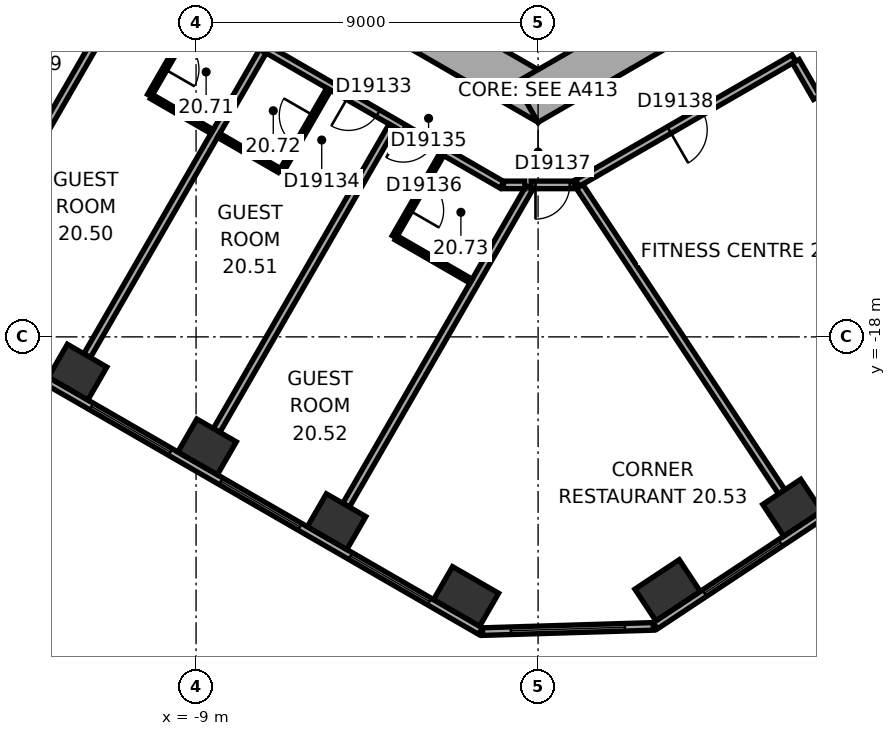
"""IFC4 building model, lengths in metres.
Left out: names, types, materials, properties, quantities, classifications, styles, units other than length and angle.
Written with IfcOpenShell. Run it as: python <this file> out.ifc"""

import sys

from ifc_helpers import new_model, si_unit, direction, frame, frame_2d, origin, origin_2d, place, context, subcontext, project, spatial, rectangle, extrude, element, fill, save


model = new_model("IFC4")
c1 = context("Model", 3, precision=1e-05, world=origin(), true_north=direction((0.0, 1.0)))
c2 = subcontext(c1, "Body", "Model", "MODEL_VIEW")
j1 = project(units=[si_unit("LENGTHUNIT", "METRE"), si_unit("PLANEANGLEUNIT", "RADIAN")], contexts=[c1])
p1 = place(None, origin())
s1 = spatial("IfcSite", under=j1, at=p1, CompositionType="ELEMENT")
p2 = place(p1, origin())
s2 = spatial("IfcBuilding", under=s1, at=p2, CompositionType="ELEMENT")
p3 = place(p2, frame((0.0, 0.0, 90.2)))
s3 = spatial("IfcBuildingStorey", under=s2, at=p3, CompositionType="ELEMENT", Elevation=90.2)
for number, where, z_axis, x_axis in (
    (1, (-12.117, -18.927, 0.0), (0.0, 0.0, 1.0), (0.866, -0.5, 0.0)),
    (2, (-8.71, -20.895, 0.0), (0.0, 0.0, 1.0), (0.866, -0.5, 0.0)),
    (3, (-5.302, -22.862, 0.0), (0.0, 0.0, 1.0), (0.866, -0.5, 0.0)),
):
    element("IfcColumn", number, at=place(p3, frame(where, z_axis=z_axis, x_axis=x_axis)), inside=s3, PredefinedType="COLUMN", context=c2, shape_type="SweptSolid", body=[
        extrude(rectangle(XDim=1.2, YDim=1.0, at=origin_2d()), origin(), (0.0, 0.0, 1.0), 3.3),
    ])
for number, where, z_axis, x_axis in (
    (4, (-1.895, -24.829, 0.0), (0.0, 0.0, 1.0), (0.866, -0.5, 0.0)),
    (5, (3.407, -24.667, 0.0), (0.0, 0.0, 1.0), (0.834, 0.552, 0.0)),
):
    element("IfcColumn", number, at=place(p3, frame(where, z_axis=z_axis, x_axis=x_axis)), inside=s3, PredefinedType="COLUMN", context=c2, shape_type="SweptSolid", body=[
        extrude(rectangle(XDim=1.4, YDim=1.0, at=origin_2d()), origin(), (0.0, 0.0, 1.0), 3.3),
    ])
p4 = place(p3, frame((6.688, -22.496, 0.0), z_axis=(0.0, 0.0, 1.0), x_axis=(0.833885822067, 0.551936985312, 0.0)))
e6 = element("IfcColumn", 6, at=p4, inside=s3, PredefinedType="COLUMN", context=c2, shape_type="SweptSolid", body=[
    extrude(rectangle(XDim=1.2, YDim=1.0, at=origin_2d()), origin(), (0.0, 0.0, 1.0), 3.3),
])
p5 = place(p3, frame((-10.4, -5.658, 0.0), z_axis=(0.0, 0.0, 1.0), x_axis=(0.866021384402, -0.500006961711, 0.0)))
e7 = element("IfcWall", 7, at=p5, inside=s3, PredefinedType="SHEAR", context=c2, shape_type="SweptSolid", body=[
    extrude(rectangle(XDim=12.355, YDim=1.2, at=frame_2d((6.178, 0.0))), origin(), (0.0, 0.0, 1.0), 3.3),
])
p6 = place(p5, frame((6.378, 0.0, 0.0)))
e8 = element("IfcOpeningElement", 8, at=p6, cuts=e7, PredefinedType="OPENING", context=c2, shape_type="SweptSolid", body=[
    extrude(rectangle(XDim=1.5, YDim=2.1, at=frame_2d((0.75, 1.05))), frame((0.0, 0.61, 0.0), z_axis=(0.0, -1.0, 0.0), x_axis=(1.0, 0.0, 0.0)), (0.0, 0.0, 1.0), 1.22),
])
p7 = place(p5, frame((3.228, 0.0, 0.0)))
e9 = element("IfcOpeningElement", 9, at=p7, cuts=e7, PredefinedType="OPENING", context=c2, shape_type="SweptSolid", body=[
    extrude(rectangle(XDim=0.9, YDim=2.1, at=frame_2d((0.45, 1.05))), frame((0.0, 0.61, 0.0), z_axis=(0.0, -1.0, 0.0), x_axis=(1.0, 0.0, 0.0)), (0.0, 0.0, 1.0), 1.22),
])
p8 = place(p3, frame((-0.3, -11.836, 0.0), z_axis=(0.0, 0.0, 1.0), x_axis=(0.866021384402, 0.500006961711, 0.0)))
e10 = element("IfcWall", 10, at=p8, inside=s3, PredefinedType="SHEAR", context=c2, shape_type="SweptSolid", body=[
    extrude(rectangle(XDim=12.355, YDim=1.2, at=frame_2d((6.178, 0.0))), origin(), (0.0, 0.0, 1.0), 3.3),
])
p9 = place(p8, frame((4.128, 0.0, 0.0)))
e11 = element("IfcOpeningElement", 11, at=p9, cuts=e10, PredefinedType="OPENING", context=c2, shape_type="SweptSolid", body=[
    extrude(rectangle(XDim=0.9, YDim=2.1, at=frame_2d((0.45, 1.05))), frame((0.0, 0.61, 0.0), z_axis=(0.0, -1.0, 0.0), x_axis=(1.0, 0.0, 0.0)), (0.0, 0.0, 1.0), 1.22),
])
p10 = place(p8, frame((7.928, 0.0, 0.0)))
e12 = element("IfcOpeningElement", 12, at=p10, cuts=e10, PredefinedType="OPENING", context=c2, shape_type="SweptSolid", body=[
    extrude(rectangle(XDim=1.1, YDim=2.1, at=frame_2d((0.55, 1.05))), frame((0.0, 0.61, 0.0), z_axis=(0.0, -1.0, 0.0), x_axis=(1.0, 0.0, 0.0)), (0.0, 0.0, 1.0), 1.22),
])
p11 = place(p3, frame((-19.914, -15.119, 0.0), z_axis=(0.0, 0.0, 1.0), x_axis=(0.866025418898, -0.499999973822, 0.0)))
e13 = element("IfcWall", 13, at=p11, inside=s3, PredefinedType="STANDARD", context=c2, shape_type="SweptSolid", body=[
    extrude(rectangle(XDim=21.246, YDim=0.2, at=frame_2d((10.623, 0.0))), origin(), (0.0, 0.0, 1.0), 3.3),
])
p12 = place(p11, frame((1.555, 0.0, 0.8)))
e14 = element("IfcOpeningElement", 14, at=p12, cuts=e13, PredefinedType="OPENING", context=c2, shape_type="SweptSolid", body=[
    extrude(rectangle(XDim=2.4, YDim=1.7, at=frame_2d((1.2, 0.85))), frame((0.0, 0.11, 0.0), z_axis=(0.0, -1.0, 0.0), x_axis=(1.0, 0.0, 0.0)), (0.0, 0.0, 1.0), 0.22),
])
p13 = place(p11, frame((5.489, 0.0, 0.8)))
e15 = element("IfcOpeningElement", 15, at=p13, cuts=e13, PredefinedType="OPENING", context=c2, shape_type="SweptSolid", body=[
    extrude(rectangle(XDim=2.4, YDim=1.7, at=frame_2d((1.2, 0.85))), frame((0.0, 0.11, 0.0), z_axis=(0.0, -1.0, 0.0), x_axis=(1.0, 0.0, 0.0)), (0.0, 0.0, 1.0), 0.22),
])
p14 = place(p11, frame((9.424, 0.0, 0.8)))
e16 = element("IfcOpeningElement", 16, at=p14, cuts=e13, PredefinedType="OPENING", context=c2, shape_type="SweptSolid", body=[
    extrude(rectangle(XDim=2.4, YDim=1.7, at=frame_2d((1.2, 0.85))), frame((0.0, 0.11, 0.0), z_axis=(0.0, -1.0, 0.0), x_axis=(1.0, 0.0, 0.0)), (0.0, 0.0, 1.0), 0.22),
])
p15 = place(p11, frame((13.358, 0.0, 0.8)))
e17 = element("IfcOpeningElement", 17, at=p15, cuts=e13, PredefinedType="OPENING", context=c2, shape_type="SweptSolid", body=[
    extrude(rectangle(XDim=2.4, YDim=1.7, at=frame_2d((1.2, 0.85))), frame((0.0, 0.11, 0.0), z_axis=(0.0, -1.0, 0.0), x_axis=(1.0, 0.0, 0.0)), (0.0, 0.0, 1.0), 0.22),
])
p16 = place(p11, frame((17.293, 0.0, 0.8)))
e18 = element("IfcOpeningElement", 18, at=p16, cuts=e13, PredefinedType="OPENING", context=c2, shape_type="SweptSolid", body=[
    extrude(rectangle(XDim=2.4, YDim=1.7, at=frame_2d((1.2, 0.85))), frame((0.0, 0.11, 0.0), z_axis=(0.0, -1.0, 0.0), x_axis=(1.0, 0.0, 0.0)), (0.0, 0.0, 1.0), 0.22),
])
p17 = place(p3, frame((-1.461, -25.755, 0.0), z_axis=(0.0, 0.0, 1.0), x_axis=(0.999533823446, 0.030530898895, 0.0)))
e19 = element("IfcWall", 19, at=p17, inside=s3, PredefinedType="STANDARD", context=c2, shape_type="SweptSolid", body=[
    extrude(rectangle(XDim=4.494, YDim=0.2, at=frame_2d((2.247, 0.0))), origin(), (0.0, 0.0, 1.0), 3.3),
])
p18 = place(p17, frame((0.747, 0.0, 0.8)))
e20 = element("IfcOpeningElement", 20, at=p18, cuts=e19, PredefinedType="OPENING", context=c2, shape_type="SweptSolid", body=[
    extrude(rectangle(XDim=3.0, YDim=1.7, at=frame_2d((1.5, 0.85))), frame((0.0, 0.11, 0.0), z_axis=(0.0, -1.0, 0.0), x_axis=(1.0, 0.0, 0.0)), (0.0, 0.0, 1.0), 0.22),
])
p19 = place(p3, frame((3.083, -25.601, 0.0), z_axis=(0.0, 0.0, 1.0), x_axis=(0.833884295743, 0.551939291329, 0.0)))
e21 = element("IfcWall", 21, at=p19, inside=s3, PredefinedType="STANDARD", context=c2, shape_type="SweptSolid", body=[
    extrude(rectangle(XDim=21.246, YDim=0.2, at=frame_2d((10.623, 0.0))), origin(), (0.0, 0.0, 1.0), 3.3),
])
p20 = place(p19, frame((1.553, 0.0, 0.8)))
e22 = element("IfcOpeningElement", 22, at=p20, cuts=e21, PredefinedType="OPENING", context=c2, shape_type="SweptSolid", body=[
    extrude(rectangle(XDim=2.4, YDim=1.7, at=frame_2d((1.2, 0.85))), frame((0.0, 0.11, 0.0), z_axis=(0.0, -1.0, 0.0), x_axis=(1.0, 0.0, 0.0)), (0.0, 0.0, 1.0), 0.22),
])
p21 = place(p19, frame((5.488, 0.0, 0.8)))
e23 = element("IfcOpeningElement", 23, at=p21, cuts=e21, PredefinedType="OPENING", context=c2, shape_type="SweptSolid", body=[
    extrude(rectangle(XDim=2.4, YDim=1.7, at=frame_2d((1.2, 0.85))), frame((0.0, 0.11, 0.0), z_axis=(0.0, -1.0, 0.0), x_axis=(1.0, 0.0, 0.0)), (0.0, 0.0, 1.0), 0.22),
])
p22 = place(p19, frame((9.422, 0.0, 0.8)))
e24 = element("IfcOpeningElement", 24, at=p22, cuts=e21, PredefinedType="OPENING", context=c2, shape_type="SweptSolid", body=[
    extrude(rectangle(XDim=2.4, YDim=1.7, at=frame_2d((1.2, 0.85))), frame((0.0, 0.11, 0.0), z_axis=(0.0, -1.0, 0.0), x_axis=(1.0, 0.0, 0.0)), (0.0, 0.0, 1.0), 0.22),
])
p23 = place(p19, frame((13.357, 0.0, 0.8)))
e25 = element("IfcOpeningElement", 25, at=p23, cuts=e21, PredefinedType="OPENING", context=c2, shape_type="SweptSolid", body=[
    extrude(rectangle(XDim=2.4, YDim=1.7, at=frame_2d((1.2, 0.85))), frame((0.0, 0.11, 0.0), z_axis=(0.0, -1.0, 0.0), x_axis=(1.0, 0.0, 0.0)), (0.0, 0.0, 1.0), 0.22),
])
p24 = place(p19, frame((17.291, 0.0, 0.8)))
e26 = element("IfcOpeningElement", 26, at=p24, cuts=e21, PredefinedType="OPENING", context=c2, shape_type="SweptSolid", body=[
    extrude(rectangle(XDim=2.4, YDim=1.7, at=frame_2d((1.2, 0.85))), frame((0.0, 0.11, 0.0), z_axis=(0.0, -1.0, 0.0), x_axis=(1.0, 0.0, 0.0)), (0.0, 0.0, 1.0), 0.22),
])
p25 = place(p3, frame((-15.274, -16.527, 0.0), z_axis=(0.0, 0.0, 1.0), x_axis=(0.49998823431, 0.866032196602, 0.0)))
e27 = element("IfcWall", 27, at=p25, inside=s3, PredefinedType="PARTITIONING", context=c2, shape_type="SweptSolid", body=[
    extrude(rectangle(XDim=9.25, YDim=0.2, at=frame_2d((4.625, 0.0))), origin(), (0.0, 0.0, 1.0), 3.05),
])
p26 = place(p3, frame((-11.867, -18.494, 0.0), z_axis=(0.0, 0.0, 1.0), x_axis=(0.499999662836, 0.866025598446, 0.0)))
e28 = element("IfcWall", 28, at=p26, inside=s3, PredefinedType="PARTITIONING", context=c2, shape_type="SweptSolid", body=[
    extrude(rectangle(XDim=9.25, YDim=0.2, at=frame_2d((4.625, 0.0))), origin(), (0.0, 0.0, 1.0), 2.6),
])
p27 = place(p3, frame((-11.615, -7.843, 0.0), z_axis=(0.0, 0.0, 1.0), x_axis=(0.866026466995, -0.499998158461, 0.0)))
e29 = element("IfcWall", 29, at=p27, inside=s3, PredefinedType="PARTITIONING", context=c2, shape_type="SweptSolid", body=[
    extrude(rectangle(XDim=12.315, YDim=0.2, at=frame_2d((6.158, 0.0))), origin(), (0.0, 0.0, 1.0), 3.05),
])
p28 = place(p27, frame((1.665, 0.0, 0.0)))
e30 = element("IfcOpeningElement", 30, at=p28, cuts=e29, PredefinedType="OPENING", context=c2, shape_type="SweptSolid", body=[
    extrude(rectangle(XDim=0.9, YDim=2.1, at=frame_2d((0.45, 1.05))), frame((0.0, 0.11, 0.0), z_axis=(0.0, -1.0, 0.0), x_axis=(1.0, 0.0, 0.0)), (0.0, 0.0, 1.0), 0.22),
])
p29 = place(p27, frame((7.65, 0.0, 0.0)))
e31 = element("IfcOpeningElement", 31, at=p29, cuts=e29, PredefinedType="OPENING", context=c2, shape_type="SweptSolid", body=[
    extrude(rectangle(XDim=0.9, YDim=2.1, at=frame_2d((0.45, 1.05))), frame((0.0, 0.11, 0.0), z_axis=(0.0, -1.0, 0.0), x_axis=(1.0, 0.0, 0.0)), (0.0, 0.0, 1.0), 0.22),
])
p30 = place(p27, frame((9.317, 0.0, 0.0)))
e32 = element("IfcOpeningElement", 32, at=p30, cuts=e29, PredefinedType="OPENING", context=c2, shape_type="SweptSolid", body=[
    extrude(rectangle(XDim=0.9, YDim=2.1, at=frame_2d((0.45, 1.05))), frame((0.0, 0.11, 0.0), z_axis=(0.0, -1.0, 0.0), x_axis=(1.0, 0.0, 0.0)), (0.0, 0.0, 1.0), 0.22),
])
p31 = place(p3, frame((-10.224, -11.648, 0.0), z_axis=(0.0, 0.0, 1.0), x_axis=(0.500004234368, 0.866022959057, 0.0)))
e33 = element("IfcWall", 33, at=p31, inside=s3, PredefinedType="PARTITIONING", context=c2, shape_type="SweptSolid", body=[
    extrude(rectangle(XDim=2.5, YDim=0.12, at=frame_2d((1.25, 0.0))), origin(), (0.0, 0.0, 1.0), 3.05),
])
p32 = place(p31, frame((0.8, 0.0, 0.0)))
e34 = element("IfcOpeningElement", 34, at=p32, cuts=e33, PredefinedType="OPENING", context=c2, shape_type="SweptSolid", body=[
    extrude(rectangle(XDim=0.9, YDim=2.1, at=frame_2d((0.45, 1.05))), frame((0.0, 0.07, 0.0), z_axis=(0.0, -1.0, 0.0), x_axis=(1.0, 0.0, 0.0)), (0.0, 0.0, 1.0), 0.14),
])
p33 = place(p3, frame((-8.579, -12.598, 0.0), z_axis=(0.0, 0.0, 1.0), x_axis=(-0.866046386007, 0.499963655964, 0.0)))
e35 = element("IfcWall", 35, at=p33, inside=s3, PredefinedType="PARTITIONING", context=c2, shape_type="SweptSolid", body=[
    extrude(rectangle(XDim=1.84, YDim=0.12, at=frame_2d((0.92, 0.0))), origin(), (0.0, 0.0, 1.0), 3.05),
])
p34 = place(p3, frame((-8.46, -20.461, 0.0), z_axis=(0.0, 0.0, 1.0), x_axis=(0.499999662836, 0.866025598446, 0.0)))
e36 = element("IfcWall", 36, at=p34, inside=s3, PredefinedType="PARTITIONING", context=c2, shape_type="SweptSolid", body=[
    extrude(rectangle(XDim=9.25, YDim=0.2, at=frame_2d((4.625, 0.0))), origin(), (0.0, 0.0, 1.0), 3.05),
])
p35 = place(p3, frame((-6.812, -13.618, 0.0), z_axis=(0.0, 0.0, 1.0), x_axis=(-0.866046386007, 0.499963655964, 0.0)))
e37 = element("IfcWall", 37, at=p35, inside=s3, PredefinedType="PARTITIONING", context=c2, shape_type="SweptSolid", body=[
    extrude(rectangle(XDim=1.84, YDim=0.12, at=frame_2d((0.92, 0.0))), origin(), (0.0, 0.0, 1.0), 3.05),
])
p36 = place(p3, frame((-5.51, -11.483, 0.0), z_axis=(0.0, 0.0, 1.0), x_axis=(-0.500004234368, -0.866022959057, 0.0)))
e38 = element("IfcWall", 38, at=p36, inside=s3, PredefinedType="PARTITIONING", context=c2, shape_type="SweptSolid", body=[
    extrude(rectangle(XDim=2.5, YDim=0.12, at=frame_2d((1.25, 0.0))), origin(), (0.0, 0.0, 1.0), 3.05),
])
p37 = place(p36, frame((0.8, 0.0, 0.0)))
e39 = element("IfcOpeningElement", 39, at=p37, cuts=e38, PredefinedType="OPENING", context=c2, shape_type="SweptSolid", body=[
    extrude(rectangle(XDim=0.9, YDim=2.1, at=frame_2d((0.45, 1.05))), frame((0.0, 0.07, 0.0), z_axis=(0.0, -1.0, 0.0), x_axis=(1.0, 0.0, 0.0)), (0.0, 0.0, 1.0), 0.14),
])
p38 = place(p3, frame((-5.052, -22.429, 0.0), z_axis=(0.0, 0.0, 1.0), x_axis=(0.50000569793, 0.866022114058, 0.0)))
e40 = element("IfcWall", 40, at=p38, inside=s3, PredefinedType="PARTITIONING", context=c2, shape_type="SweptSolid", body=[
    extrude(rectangle(XDim=9.65, YDim=0.2, at=frame_2d((4.825, 0.0))), origin(), (0.0, 0.0, 1.0), 3.05),
])
p39 = place(p3, frame((-3.786, -15.366, 0.0), z_axis=(0.0, 0.0, 1.0), x_axis=(0.500004234368, 0.866022959057, 0.0)))
e41 = element("IfcWall", 41, at=p39, inside=s3, PredefinedType="PARTITIONING", context=c2, shape_type="SweptSolid", body=[
    extrude(rectangle(XDim=2.5, YDim=0.12, at=frame_2d((1.25, 0.0))), origin(), (0.0, 0.0, 1.0), 3.05),
])
p40 = place(p39, frame((0.8, 0.0, 0.0)))
e42 = element("IfcOpeningElement", 42, at=p40, cuts=e41, PredefinedType="OPENING", context=c2, shape_type="SweptSolid", body=[
    extrude(rectangle(XDim=0.9, YDim=2.1, at=frame_2d((0.45, 1.05))), frame((0.0, 0.07, 0.0), z_axis=(0.0, -1.0, 0.0), x_axis=(1.0, 0.0, 0.0)), (0.0, 0.0, 1.0), 0.14),
])
p41 = place(p3, frame((-1.764, -16.533, 0.0), z_axis=(0.0, 0.0, 1.0), x_axis=(-0.866008641419, 0.500029032144, 0.0)))
e43 = element("IfcWall", 43, at=p41, inside=s3, PredefinedType="PARTITIONING", context=c2, shape_type="SweptSolid", body=[
    extrude(rectangle(XDim=2.275, YDim=0.12, at=frame_2d((1.137, 0.0))), origin(), (0.0, 0.0, 1.0), 3.05),
])
p42 = place(p3, frame((-0.91, -14.001, 0.0), z_axis=(0.0, 0.0, 1.0), x_axis=(1.0, 0.0, 0.0)))
e44 = element("IfcWall", 44, at=p42, inside=s3, PredefinedType="PARTITIONING", context=c2, shape_type="SweptSolid", body=[
    extrude(rectangle(XDim=0.56, YDim=0.2, at=frame_2d((0.28, 0.0))), origin(), (0.0, 0.0, 1.0), 3.05),
])
p43 = place(p3, frame((-0.186, -14.001, 0.0), z_axis=(0.0, 0.0, 1.0), x_axis=(1.0, 0.0, 0.0)))
e45 = element("IfcWall", 45, at=p43, inside=s3, PredefinedType="PARTITIONING", context=c2, shape_type="SweptSolid", body=[
    extrude(rectangle(XDim=1.136, YDim=0.2, at=frame_2d((0.568, 0.0))), origin(), (0.0, 0.0, 1.0), 3.05),
])
p44 = place(p43, frame((0.118, 0.0, 0.0)))
e46 = element("IfcOpeningElement", 46, at=p44, cuts=e45, PredefinedType="OPENING", context=c2, shape_type="SweptSolid", body=[
    extrude(rectangle(XDim=0.9, YDim=2.1, at=frame_2d((0.45, 1.05))), frame((0.0, 0.11, 0.0), z_axis=(0.0, -1.0, 0.0), x_axis=(1.0, 0.0, 0.0)), (0.0, 0.0, 1.0), 0.22),
])
p45 = place(p3, frame((1.033, -13.953, 0.0), z_axis=(0.0, 0.0, 1.0), x_axis=(0.866017531406, 0.500013635111, 0.0)))
e47 = element("IfcWall", 47, at=p45, inside=s3, PredefinedType="PARTITIONING", context=c2, shape_type="SweptSolid", body=[
    extrude(rectangle(XDim=6.58, YDim=0.2, at=frame_2d((3.29, 0.0))), origin(), (0.0, 0.0, 1.0), 3.05),
])
p46 = place(p45, frame((2.79, 0.0, 0.0)))
e48 = element("IfcOpeningElement", 48, at=p46, cuts=e47, PredefinedType="OPENING", context=c2, shape_type="SweptSolid", body=[
    extrude(rectangle(XDim=1.0, YDim=2.1, at=frame_2d((0.5, 1.05))), frame((0.0, 0.11, 0.0), z_axis=(0.0, -1.0, 0.0), x_axis=(1.0, 0.0, 0.0)), (0.0, 0.0, 1.0), 0.22),
])
p47 = place(p3, frame((6.412, -22.079, 0.0), z_axis=(0.0, 0.0, 1.0), x_axis=(-0.551919507115, 0.83389739037, 0.0)))
e49 = element("IfcWall", 49, at=p47, inside=s3, PredefinedType="PARTITIONING", context=c2, shape_type="SweptSolid", body=[
    extrude(rectangle(XDim=9.635, YDim=0.2, at=frame_2d((4.817, 0.0))), origin(), (0.0, 0.0, 1.0), 3.05),
])
p48 = place(p3, frame((6.782, -10.749, 0.0), z_axis=(0.0, 0.0, 1.0), x_axis=(0.500074377092, -0.865982457891, 0.0)))
e50 = element("IfcWall", 50, at=p48, inside=s3, PredefinedType="PARTITIONING", context=c2, shape_type="SweptSolid", body=[
    extrude(rectangle(XDim=1.101, YDim=0.2, at=frame_2d((0.55, 0.0))), origin(), (0.0, 0.0, 1.0), 3.05),
])
p49 = place(p14, origin())
e51 = element("IfcWindow", 51, at=p49, inside=s3, PartitioningType="SINGLE_PANEL", PredefinedType="WINDOW", context=c2, shape_type="SweptSolid", body=[
    extrude(rectangle(XDim=2.4, YDim=1.7, at=frame_2d((1.2, 0.85))), frame((0.0, 0.03, 0.0), z_axis=(0.0, -1.0, 0.0), x_axis=(1.0, 0.0, 0.0)), (0.0, 0.0, 1.0), 0.06),
])
fill(e16, e51)
p50 = place(p15, origin())
e52 = element("IfcWindow", 52, at=p50, inside=s3, PartitioningType="SINGLE_PANEL", PredefinedType="WINDOW", context=c2, shape_type="SweptSolid", body=[
    extrude(rectangle(XDim=2.4, YDim=1.7, at=frame_2d((1.2, 0.85))), frame((0.0, 0.03, 0.0), z_axis=(0.0, -1.0, 0.0), x_axis=(1.0, 0.0, 0.0)), (0.0, 0.0, 1.0), 0.06),
])
fill(e17, e52)
p51 = place(p16, origin())
e53 = element("IfcWindow", 53, at=p51, inside=s3, PartitioningType="SINGLE_PANEL", PredefinedType="WINDOW", context=c2, shape_type="SweptSolid", body=[
    extrude(rectangle(XDim=2.4, YDim=1.7, at=frame_2d((1.2, 0.85))), frame((0.0, 0.03, 0.0), z_axis=(0.0, -1.0, 0.0), x_axis=(1.0, 0.0, 0.0)), (0.0, 0.0, 1.0), 0.06),
])
fill(e18, e53)
p52 = place(p18, origin())
e54 = element("IfcWindow", 54, at=p52, inside=s3, PartitioningType="SINGLE_PANEL", PredefinedType="WINDOW", context=c2, shape_type="SweptSolid", body=[
    extrude(rectangle(XDim=3.0, YDim=1.7, at=frame_2d((1.5, 0.85))), frame((0.0, 0.03, 0.0), z_axis=(0.0, -1.0, 0.0), x_axis=(1.0, 0.0, 0.0)), (0.0, 0.0, 1.0), 0.06),
])
fill(e20, e54)
p53 = place(p20, origin())
e55 = element("IfcWindow", 55, at=p53, inside=s3, PartitioningType="SINGLE_PANEL", PredefinedType="WINDOW", context=c2, shape_type="SweptSolid", body=[
    extrude(rectangle(XDim=2.4, YDim=1.7, at=frame_2d((1.2, 0.85))), frame((0.0, 0.03, 0.0), z_axis=(0.0, -1.0, 0.0), x_axis=(1.0, 0.0, 0.0)), (0.0, 0.0, 1.0), 0.06),
])
fill(e22, e55)
p54 = place(p32, origin())
e56 = element("IfcDoor", 56, at=p54, inside=s3, OperationType="SINGLE_SWING_LEFT", PredefinedType="DOOR", context=c2, shape_type="SweptSolid", body=[
    extrude(rectangle(XDim=0.9, YDim=2.1, at=frame_2d((0.45, 1.05))), frame((0.0, 0.025, 0.0), z_axis=(0.0, -1.0, 0.0), x_axis=(1.0, 0.0, 0.0)), (0.0, 0.0, 1.0), 0.05),
])
fill(e34, e56)
p55 = place(p29, origin())
e57 = element("IfcDoor", 57, at=p55, inside=s3, OperationType="SINGLE_SWING_LEFT", PredefinedType="DOOR", context=c2, shape_type="SweptSolid", body=[
    extrude(rectangle(XDim=0.9, YDim=2.1, at=frame_2d((0.45, 1.05))), frame((0.0, 0.025, 0.0), z_axis=(0.0, -1.0, 0.0), x_axis=(1.0, 0.0, 0.0)), (0.0, 0.0, 1.0), 0.05),
])
fill(e31, e57)
p56 = place(p37, origin())
e58 = element("IfcDoor", 58, at=p56, inside=s3, OperationType="SINGLE_SWING_LEFT", PredefinedType="DOOR", context=c2, shape_type="SweptSolid", body=[
    extrude(rectangle(XDim=0.9, YDim=2.1, at=frame_2d((0.45, 1.05))), frame((0.0, 0.025, 0.0), z_axis=(0.0, -1.0, 0.0), x_axis=(1.0, 0.0, 0.0)), (0.0, 0.0, 1.0), 0.05),
])
fill(e39, e58)
p57 = place(p30, origin())
e59 = element("IfcDoor", 59, at=p57, inside=s3, OperationType="SINGLE_SWING_LEFT", PredefinedType="DOOR", context=c2, shape_type="SweptSolid", body=[
    extrude(rectangle(XDim=0.9, YDim=2.1, at=frame_2d((0.45, 1.05))), frame((0.0, 0.025, 0.0), z_axis=(0.0, -1.0, 0.0), x_axis=(1.0, 0.0, 0.0)), (0.0, 0.0, 1.0), 0.05),
])
fill(e32, e59)
p58 = place(p40, origin())
e60 = element("IfcDoor", 60, at=p58, inside=s3, OperationType="SINGLE_SWING_LEFT", PredefinedType="DOOR", context=c2, shape_type="SweptSolid", body=[
    extrude(rectangle(XDim=0.9, YDim=2.1, at=frame_2d((0.45, 1.05))), frame((0.0, 0.025, 0.0), z_axis=(0.0, -1.0, 0.0), x_axis=(1.0, 0.0, 0.0)), (0.0, 0.0, 1.0), 0.05),
])
fill(e42, e60)
p59 = place(p44, origin())
e61 = element("IfcDoor", 61, at=p59, inside=s3, OperationType="SINGLE_SWING_LEFT", PredefinedType="DOOR", context=c2, shape_type="SweptSolid", body=[
    extrude(rectangle(XDim=0.9, YDim=2.1, at=frame_2d((0.45, 1.05))), frame((0.0, 0.025, 0.0), z_axis=(0.0, -1.0, 0.0), x_axis=(1.0, 0.0, 0.0)), (0.0, 0.0, 1.0), 0.05),
])
fill(e46, e61)
p60 = place(p46, origin())
e62 = element("IfcDoor", 62, at=p60, inside=s3, OperationType="SINGLE_SWING_LEFT", PredefinedType="DOOR", context=c2, shape_type="SweptSolid", body=[
    extrude(rectangle(XDim=1.0, YDim=2.1, at=frame_2d((0.5, 1.05))), frame((0.0, 0.025, 0.0), z_axis=(0.0, -1.0, 0.0), x_axis=(1.0, 0.0, 0.0)), (0.0, 0.0, 1.0), 0.05),
])
fill(e48, e62)
save(model, sys.argv[1])
